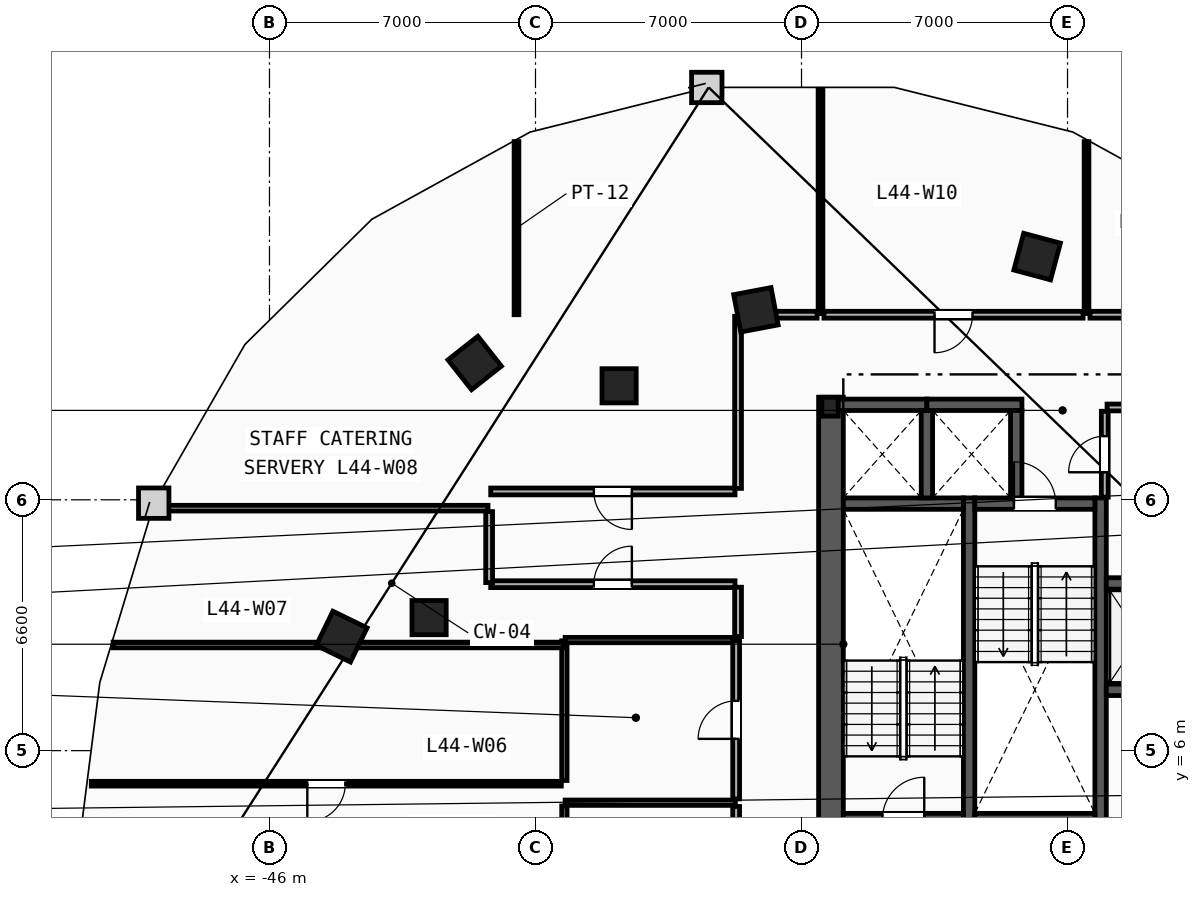
"""IFC4 building model, lengths in metres.
Left out: names, types, materials, properties, quantities, classifications, styles, units other than length and angle.
Written with IfcOpenShell. Run it as: python <this file> out.ifc"""

import sys

from ifc_helpers import new_model, si_unit, direction, frame, frame_2d, origin, origin_2d, place, context, subcontext, project, spatial, rectangle, i_section, extrude, element, fill, save


model = new_model("IFC4")
c1 = context("Model", 3, precision=1e-05, world=origin(), true_north=direction((0.0, 1.0)))
c2 = subcontext(c1, "Body", "Model", "MODEL_VIEW")
j1 = project(units=[si_unit("LENGTHUNIT", "METRE"), si_unit("PLANEANGLEUNIT", "RADIAN")], contexts=[c1])
p1 = place(None, origin())
s1 = spatial("IfcSite", under=j1, at=p1, CompositionType="ELEMENT")
p2 = place(p1, origin())
s2 = spatial("IfcBuilding", under=s1, at=p2, CompositionType="ELEMENT")
p3 = place(p2, frame((0.0, 0.0, 169.2)))
s3 = spatial("IfcBuildingStorey", under=s2, at=p3, CompositionType="ELEMENT", Elevation=169.2)
p4 = place(p3, frame((-31.25, 15.05, 0.0), z_axis=(0.0, 0.0, 1.0), x_axis=(1.0, 0.0, 0.0)))
e1 = element("IfcColumn", 1, at=p4, inside=s3, PredefinedType="COLUMN", context=c2, shape_type="SweptSolid", body=[
    extrude(i_section(OverallWidth=0.432, OverallDepth=0.498, WebThickness=0.056, FlangeThickness=0.089, FilletRadius=0.018, at=origin_2d()), origin(), (0.0, 0.0, 1.0), 3.6),
])
for number, where, z_axis, x_axis in (
    (2, (-41.8, 9.5, 0.0), (0.0, 0.0, 1.0), (1.0, 0.0, 0.0)),
    (3, (-36.8, 15.6, 0.0), (0.0, 0.0, 1.0), (1.0, 0.0, 0.0)),
):
    element("IfcColumn", number, at=place(p3, frame(where, z_axis=z_axis, x_axis=x_axis)), inside=s3, PredefinedType="COLUMN", context=c2, shape_type="SweptSolid", body=[
        extrude(rectangle(XDim=0.9, YDim=0.9, at=origin_2d()), origin(), (0.0, 0.0, 1.0), 3.6),
    ])
for number, where, z_axis, x_axis in (
    (4, (-25.8, 19.0, 0.0), (0.0, 0.0, 1.0), (-0.966, 0.259, 0.0)),
    (5, (-33.2, 17.6, 0.0), (0.0, 0.0, 1.0), (-0.983, -0.186, 0.0)),
    (6, (-40.6, 16.2, 0.0), (0.0, 0.0, 1.0), (-0.785, -0.619, 0.0)),
    (7, (-44.1, 9.0, 0.0), (0.0, 0.0, 1.0), (-0.437, -0.899, 0.0)),
):
    element("IfcColumn", number, at=place(p3, frame(where, z_axis=z_axis, x_axis=x_axis)), inside=s3, PredefinedType="COLUMN", context=c2, shape_type="SweptSolid", body=[
        extrude(rectangle(XDim=1.0, YDim=1.0, at=origin_2d()), origin(), (0.0, 0.0, 1.0), 3.6),
    ])
p5 = place(p3, frame((-31.225, 1.97, 0.0), z_axis=(0.0, 0.0, 1.0), x_axis=(0.0, 1.0, 0.0)))
e8 = element("IfcWall", 8, at=p5, inside=s3, PredefinedType="SHEAR", context=c2, shape_type="SweptSolid", body=[
    extrude(rectangle(XDim=13.33, YDim=0.65, at=frame_2d((6.665, 0.0))), origin(), (0.0, 0.0, 1.0), 3.36),
])
for number, where, z_axis, x_axis in (
    (9, (-27.59, 1.97, 0.0), (0.0, 0.0, 1.0), (0.0, 1.0, 0.0)),
    (10, (-24.13, 1.97, 0.0), (0.0, 0.0, 1.0), (0.0, 1.0, 0.0)),
):
    element("IfcWall", number, at=place(p3, frame(where, z_axis=z_axis, x_axis=x_axis)), inside=s3, PredefinedType="SHEAR", context=c2, shape_type="SweptSolid", body=[
        extrude(rectangle(XDim=10.68, YDim=0.3, at=frame_2d((5.34, 0.0))), origin(), (0.0, 0.0, 1.0), 3.36),
    ])
p6 = place(p3, frame((-30.9, 4.2, 0.0), z_axis=(0.0, 0.0, 1.0), x_axis=(1.0, 0.0, 0.0)))
e11 = element("IfcWall", 11, at=p6, inside=s3, PredefinedType="SHEAR", context=c2, shape_type="SweptSolid", body=[
    extrude(rectangle(XDim=3.16, YDim=0.3, at=frame_2d((1.58, 0.0))), origin(), (0.0, 0.0, 1.0), 3.36),
])
p7 = place(p6, frame((1.03, 0.0, 0.0)))
e12 = element("IfcOpeningElement", 12, at=p7, cuts=e11, PredefinedType="OPENING", context=c2, shape_type="SweptSolid", body=[
    extrude(rectangle(XDim=1.1, YDim=2.15, at=frame_2d((0.55, 1.075))), frame((0.0, 0.16, 0.0), z_axis=(0.0, -1.0, 0.0), x_axis=(1.0, 0.0, 0.0)), (0.0, 0.0, 1.0), 0.32),
])
p8 = place(p3, frame((-30.9, 12.5, 0.0), z_axis=(0.0, 0.0, 1.0), x_axis=(1.0, 0.0, 0.0)))
e13 = element("IfcWall", 13, at=p8, inside=s3, PredefinedType="SHEAR", context=c2, shape_type="SweptSolid", body=[
    extrude(rectangle(XDim=3.16, YDim=0.3, at=frame_2d((1.58, 0.0))), origin(), (0.0, 0.0, 1.0), 3.36),
])
p9 = place(p3, frame((-27.44, 12.5, 0.0), z_axis=(0.0, 0.0, 1.0), x_axis=(1.0, 0.0, 0.0)))
e14 = element("IfcWall", 14, at=p9, inside=s3, PredefinedType="SHEAR", context=c2, shape_type="SweptSolid", body=[
    extrude(rectangle(XDim=3.16, YDim=0.3, at=frame_2d((1.58, 0.0))), origin(), (0.0, 0.0, 1.0), 3.36),
])
p10 = place(p9, frame((1.03, 0.0, 0.0)))
e15 = element("IfcOpeningElement", 15, at=p10, cuts=e14, PredefinedType="OPENING", context=c2, shape_type="SweptSolid", body=[
    extrude(rectangle(XDim=1.1, YDim=2.15, at=frame_2d((0.55, 1.075))), frame((0.0, 0.16, 0.0), z_axis=(0.0, -1.0, 0.0), x_axis=(1.0, 0.0, 0.0)), (0.0, 0.0, 1.0), 0.32),
])
p11 = place(p3, frame((-27.44, 4.2, 0.0), z_axis=(0.0, 0.0, 1.0), x_axis=(1.0, 0.0, 0.0)))
e16 = element("IfcWall", 16, at=p11, inside=s3, PredefinedType="SHEAR", context=c2, shape_type="SweptSolid", body=[
    extrude(rectangle(XDim=3.16, YDim=0.3, at=frame_2d((1.58, 0.0))), origin(), (0.0, 0.0, 1.0), 3.36),
])
p12 = place(p3, frame((-23.98, 7.6, 0.0), z_axis=(0.0, 0.0, 1.0), x_axis=(1.0, 0.0, 0.0)))
e17 = element("IfcWall", 17, at=p12, inside=s3, PredefinedType="SHEAR", context=c2, shape_type="SweptSolid", body=[
    extrude(rectangle(XDim=2.1, YDim=0.3, at=frame_2d((1.05, 0.0))), origin(), (0.0, 0.0, 1.0), 3.36),
])
p13 = place(p12, frame((0.475, 0.0, 0.0)))
e18 = element("IfcOpeningElement", 18, at=p13, cuts=e17, PredefinedType="OPENING", context=c2, shape_type="SweptSolid", body=[
    extrude(rectangle(XDim=1.15, YDim=2.2, at=frame_2d((0.575, 1.1))), frame((0.0, 0.16, 0.0), z_axis=(0.0, -1.0, 0.0), x_axis=(1.0, 0.0, 0.0)), (0.0, 0.0, 1.0), 0.32),
])
p14 = place(p3, frame((-23.98, 10.4, 0.0), z_axis=(0.0, 0.0, 1.0), x_axis=(1.0, 0.0, 0.0)))
e19 = element("IfcWall", 19, at=p14, inside=s3, PredefinedType="SHEAR", context=c2, shape_type="SweptSolid", body=[
    extrude(rectangle(XDim=2.1, YDim=0.3, at=frame_2d((1.05, 0.0))), origin(), (0.0, 0.0, 1.0), 3.36),
])
p15 = place(p3, frame((-31.2, 15.1, 0.0), z_axis=(0.0, 0.0, 1.0), x_axis=(1.0, 0.0, 0.0)))
e20 = element("IfcWall", 20, at=p15, inside=s3, PredefinedType="SHEAR", context=c2, shape_type="SweptSolid", body=[
    extrude(rectangle(XDim=2.5, YDim=0.3, at=frame_2d((1.25, 0.0))), origin(), (0.0, 0.0, 1.0), 3.36),
])
p16 = place(p3, frame((-28.7, 12.65, 0.0), z_axis=(0.0, 0.0, 1.0), x_axis=(0.0, 1.0, 0.0)))
e21 = element("IfcWall", 21, at=p16, inside=s3, PredefinedType="SHEAR", context=c2, shape_type="SweptSolid", body=[
    extrude(rectangle(XDim=2.3, YDim=0.3, at=frame_2d((1.15, 0.0))), origin(), (0.0, 0.0, 1.0), 3.36),
])
p17 = place(p3, frame((-28.7, 15.1, 0.0), z_axis=(0.0, 0.0, 1.0), x_axis=(1.0, 0.0, 0.0)))
e22 = element("IfcWall", 22, at=p17, inside=s3, PredefinedType="SHEAR", context=c2, shape_type="SweptSolid", body=[
    extrude(rectangle(XDim=2.5, YDim=0.3, at=frame_2d((1.25, 0.0))), origin(), (0.0, 0.0, 1.0), 3.36),
])
p18 = place(p3, frame((-26.35, 12.65, 0.0), z_axis=(0.0, 0.0, 1.0), x_axis=(0.0, 1.0, 0.0)))
e23 = element("IfcWall", 23, at=p18, inside=s3, PredefinedType="SHEAR", context=c2, shape_type="SweptSolid", body=[
    extrude(rectangle(XDim=2.3, YDim=0.3, at=frame_2d((1.15, 0.0))), origin(), (0.0, 0.0, 1.0), 3.36),
])
p19 = place(p3, frame((-23.96, 15.03, 0.0), z_axis=(0.0, 0.0, 1.0), x_axis=(1.0, 0.0, 0.0)))
e24 = element("IfcWall", 24, at=p19, inside=s3, PredefinedType="PARTITIONING", context=c2, shape_type="SweptSolid", body=[
    extrude(rectangle(XDim=2.61, YDim=0.18, at=frame_2d((1.305, 0.0))), origin(), (0.0, 0.0, 1.0), 2.433),
])
p20 = place(p3, frame((-24.02, 12.67, 0.0), z_axis=(0.0, 0.0, 1.0), x_axis=(0.0, 1.0, 0.0)))
e25 = element("IfcWall", 25, at=p20, inside=s3, PredefinedType="PARTITIONING", context=c2, shape_type="SweptSolid", body=[
    extrude(rectangle(XDim=2.26, YDim=0.18, at=frame_2d((1.13, 0.0))), origin(), (0.0, 0.0, 1.0), 3.36),
])
p21 = place(p20, frame((0.655, 0.0, 0.0)))
e26 = element("IfcOpeningElement", 26, at=p21, cuts=e25, PredefinedType="OPENING", context=c2, shape_type="SweptSolid", body=[
    extrude(rectangle(XDim=0.95, YDim=2.1, at=frame_2d((0.475, 1.05))), frame((0.0, 0.1, 0.0), z_axis=(0.0, -1.0, 0.0), x_axis=(1.0, 0.0, 0.0)), (0.0, 0.0, 1.0), 0.2),
])
p22 = place(p3, frame((-38.24, 1.615, 0.0), z_axis=(0.0, 0.0, 1.0), x_axis=(0.0, 1.0, 0.0)))
e27 = element("IfcWall", 27, at=p22, inside=s3, PredefinedType="PARTITIONING", context=c2, shape_type="SweptSolid", body=[
    extrude(rectangle(XDim=2.93, YDim=0.14, at=frame_2d((1.465, 0.0))), origin(), (0.0, 0.0, 1.0), 3.36),
])
p23 = place(p3, frame((-38.24, 5.215, 0.0), z_axis=(0.0, 0.0, 1.0), x_axis=(0.0, 1.0, 0.0)))
e28 = element("IfcWall", 28, at=p23, inside=s3, PredefinedType="PARTITIONING", context=c2, shape_type="SweptSolid", body=[
    extrude(rectangle(XDim=3.675, YDim=0.14, at=frame_2d((1.837, 0.0))), origin(), (0.0, 0.0, 1.0), 3.36),
])
for number, where, z_axis, x_axis in (
    (29, (-38.22, 4.63, 0.0), (0.0, 0.0, 1.0), (1.0, 0.0, 0.0)),
    (30, (-38.22, 8.91, 0.0), (0.0, 0.0, 1.0), (1.0, 0.0, 0.0)),
):
    element("IfcWall", number, at=place(p3, frame(where, z_axis=z_axis, x_axis=x_axis)), inside=s3, PredefinedType="PARTITIONING", context=c2, shape_type="SweptSolid", body=[
        extrude(rectangle(XDim=4.48, YDim=0.14, at=frame_2d((2.24, 0.0))), origin(), (0.0, 0.0, 1.0), 3.36),
    ])
p24 = place(p3, frame((-33.72, 0.27, 0.0), z_axis=(0.0, 0.0, 1.0), x_axis=(0.0, 1.0, 0.0)))
e31 = element("IfcWall", 31, at=p24, inside=s3, PredefinedType="PARTITIONING", context=c2, shape_type="SweptSolid", body=[
    extrude(rectangle(XDim=4.26, YDim=0.18, at=frame_2d((2.13, 0.0))), origin(), (0.0, 0.0, 1.0), 3.36),
])
p25 = place(p24, frame((1.655, 0.0, 0.0)))
e32 = element("IfcOpeningElement", 32, at=p25, cuts=e31, PredefinedType="OPENING", context=c2, shape_type="SweptSolid", body=[
    extrude(rectangle(XDim=0.95, YDim=2.1, at=frame_2d((0.475, 1.05))), frame((0.0, 0.1, 0.0), z_axis=(0.0, -1.0, 0.0), x_axis=(1.0, 0.0, 0.0)), (0.0, 0.0, 1.0), 0.2),
])
p26 = place(p3, frame((-33.72, 4.73, 0.0), z_axis=(0.0, 0.0, 1.0), x_axis=(0.0, 1.0, 0.0)))
e33 = element("IfcWall", 33, at=p26, inside=s3, PredefinedType="PARTITIONING", context=c2, shape_type="SweptSolid", body=[
    extrude(rectangle(XDim=4.16, YDim=0.18, at=frame_2d((2.08, 0.0))), origin(), (0.0, 0.0, 1.0), 3.36),
])
p27 = place(p26, frame((1.58, 0.0, 0.0)))
e34 = element("IfcOpeningElement", 34, at=p27, cuts=e33, PredefinedType="OPENING", context=c2, shape_type="SweptSolid", body=[
    extrude(rectangle(XDim=1.0, YDim=2.15, at=frame_2d((0.5, 1.075))), frame((0.0, 0.1, 0.0), z_axis=(0.0, -1.0, 0.0), x_axis=(1.0, 0.0, 0.0)), (0.0, 0.0, 1.0), 0.2),
])
p28 = place(p3, frame((-50.115, 8.78, 0.0), z_axis=(0.0, 0.0, 1.0), x_axis=(1.0, 0.0, 0.0)))
e35 = element("IfcWall", 35, at=p28, inside=s3, PredefinedType="PARTITIONING", context=c2, shape_type="SweptSolid", body=[
    extrude(rectangle(XDim=11.845, YDim=0.15, at=frame_2d((5.922, 0.0))), origin(), (0.0, 0.0, 1.0), 3.36),
])
p29 = place(p3, frame((-49.024, 12.38, 0.0), z_axis=(0.0, 0.0, 1.0), x_axis=(1.0, 0.0, 0.0)))
e36 = element("IfcWall", 36, at=p29, inside=s3, PredefinedType="PARTITIONING", context=c2, shape_type="SweptSolid", body=[
    extrude(rectangle(XDim=8.774, YDim=0.15, at=frame_2d((4.387, 0.0))), origin(), (0.0, 0.0, 1.0), 3.36),
])
p30 = place(p3, frame((-39.5, 17.47, 0.0), z_axis=(0.0, 0.0, 1.0), x_axis=(0.0, 1.0, 0.0)))
e37 = element("IfcWall", 37, at=p30, inside=s3, PredefinedType="PARTITIONING", context=c2, shape_type="SweptSolid", body=[
    extrude(rectangle(XDim=4.555, YDim=0.125, at=frame_2d((2.278, 0.0))), origin(), (0.0, 0.0, 1.0), 3.36),
])
p31 = place(p3, frame((-31.5, 17.5, 0.0), z_axis=(0.0, 0.0, 1.0), x_axis=(0.0, 1.0, 0.0)))
e38 = element("IfcWall", 38, at=p31, inside=s3, PredefinedType="PARTITIONING", context=c2, shape_type="SweptSolid", body=[
    extrude(rectangle(XDim=5.902, YDim=0.125, at=frame_2d((2.951, 0.0))), origin(), (0.0, 0.0, 1.0), 3.36),
])
p32 = place(p3, frame((-24.5, 17.5, 0.0), z_axis=(0.0, 0.0, 1.0), x_axis=(0.0, 1.0, 0.0)))
e39 = element("IfcWall", 39, at=p32, inside=s3, PredefinedType="PARTITIONING", context=c2, shape_type="SweptSolid", body=[
    extrude(rectangle(XDim=4.525, YDim=0.125, at=frame_2d((2.263, 0.0))), origin(), (0.0, 0.0, 1.0), 3.36),
])
p33 = place(p3, frame((-40.178, 10.38, 0.0), z_axis=(0.0, 0.0, 1.0), x_axis=(1.0, 0.0, 0.0)))
e40 = element("IfcWall", 40, at=p33, inside=s3, PredefinedType="PARTITIONING", context=c2, shape_type="SweptSolid", body=[
    extrude(rectangle(XDim=6.428, YDim=0.18, at=frame_2d((3.214, 0.0))), origin(), (0.0, 0.0, 1.0), 3.36),
])
p34 = place(p33, frame((2.714, 0.0, 0.0)))
e41 = element("IfcOpeningElement", 41, at=p34, cuts=e40, PredefinedType="OPENING", context=c2, shape_type="SweptSolid", body=[
    extrude(rectangle(XDim=1.0, YDim=2.15, at=frame_2d((0.5, 1.075))), frame((0.0, 0.1, 0.0), z_axis=(0.0, -1.0, 0.0), x_axis=(1.0, 0.0, 0.0)), (0.0, 0.0, 1.0), 0.2),
])
p35 = place(p3, frame((-40.22, 12.29, 0.0), z_axis=(0.0, 0.0, 1.0), x_axis=(0.0, -1.0, 0.0)))
e42 = element("IfcWall", 42, at=p35, inside=s3, PredefinedType="PARTITIONING", context=c2, shape_type="SweptSolid", body=[
    extrude(rectangle(XDim=1.869, YDim=0.18, at=frame_2d((0.934, 0.0))), origin(), (0.0, 0.0, 1.0), 3.36),
])
p36 = place(p3, frame((-33.67, 10.3, 0.0), z_axis=(0.0, 0.0, 1.0), x_axis=(0.0, -1.0, 0.0)))
e43 = element("IfcWall", 43, at=p36, inside=s3, PredefinedType="PARTITIONING", context=c2, shape_type="SweptSolid", body=[
    extrude(rectangle(XDim=1.299, YDim=0.18, at=frame_2d((0.649, 0.0))), origin(), (0.0, 0.0, 1.0), 3.36),
])
p37 = place(p3, frame((-33.75, 12.82, 0.0), z_axis=(0.0, 0.0, 1.0), x_axis=(-1.0, 0.0, 0.0)))
e44 = element("IfcWall", 44, at=p37, inside=s3, PredefinedType="PARTITIONING", context=c2, shape_type="SweptSolid", body=[
    extrude(rectangle(XDim=6.428, YDim=0.18, at=frame_2d((3.214, 0.0))), origin(), (0.0, 0.0, 1.0), 3.36),
])
p38 = place(p37, frame((2.714, 0.0, 0.0)))
e45 = element("IfcOpeningElement", 45, at=p38, cuts=e44, PredefinedType="OPENING", context=c2, shape_type="SweptSolid", body=[
    extrude(rectangle(XDim=1.0, YDim=2.15, at=frame_2d((0.5, 1.075))), frame((0.0, 0.1, 0.0), z_axis=(0.0, -1.0, 0.0), x_axis=(1.0, 0.0, 0.0)), (0.0, 0.0, 1.0), 0.2),
])
p39 = place(p3, frame((-33.67, 17.428, 0.0), z_axis=(0.0, 0.0, 1.0), x_axis=(0.0, -1.0, 0.0)))
e46 = element("IfcWall", 46, at=p39, inside=s3, PredefinedType="PARTITIONING", context=c2, shape_type="SweptSolid", body=[
    extrude(rectangle(XDim=4.529, YDim=0.18, at=frame_2d((2.264, 0.0))), origin(), (0.0, 0.0, 1.0), 3.36),
])
p40 = place(p3, frame((-31.59, 17.47, 0.0), z_axis=(0.0, 0.0, 1.0), x_axis=(-1.0, 0.0, 0.0)))
e47 = element("IfcWall", 47, at=p40, inside=s3, PredefinedType="PARTITIONING", context=c2, shape_type="SweptSolid", body=[
    extrude(rectangle(XDim=2.038, YDim=0.18, at=frame_2d((1.019, 0.0))), origin(), (0.0, 0.0, 1.0), 3.36),
])
p41 = place(p3, frame((-18.342, 17.47, 0.0), z_axis=(0.0, 0.0, 1.0), x_axis=(-1.0, 0.0, 0.0)))
e48 = element("IfcWall", 48, at=p41, inside=s3, PredefinedType="PARTITIONING", context=c2, shape_type="SweptSolid", body=[
    extrude(rectangle(XDim=6.068, YDim=0.18, at=frame_2d((3.034, 0.0))), origin(), (0.0, 0.0, 1.0), 3.36),
])
p42 = place(p41, frame((2.534, 0.0, 0.0)))
e49 = element("IfcOpeningElement", 49, at=p42, cuts=e48, PredefinedType="OPENING", context=c2, shape_type="SweptSolid", body=[
    extrude(rectangle(XDim=1.0, YDim=2.15, at=frame_2d((0.5, 1.075))), frame((0.0, 0.1, 0.0), z_axis=(0.0, -1.0, 0.0), x_axis=(1.0, 0.0, 0.0)), (0.0, 0.0, 1.0), 0.2),
])
p43 = place(p3, frame((-24.59, 17.47, 0.0), z_axis=(0.0, 0.0, 1.0), x_axis=(-1.0, 0.0, 0.0)))
e50 = element("IfcWall", 50, at=p43, inside=s3, PredefinedType="PARTITIONING", context=c2, shape_type="SweptSolid", body=[
    extrude(rectangle(XDim=6.82, YDim=0.18, at=frame_2d((3.41, 0.0))), origin(), (0.0, 0.0, 1.0), 3.36),
])
p44 = place(p43, frame((2.91, 0.0, 0.0)))
e51 = element("IfcOpeningElement", 51, at=p44, cuts=e50, PredefinedType="OPENING", context=c2, shape_type="SweptSolid", body=[
    extrude(rectangle(XDim=1.0, YDim=2.15, at=frame_2d((0.5, 1.075))), frame((0.0, 0.1, 0.0), z_axis=(0.0, -1.0, 0.0), x_axis=(1.0, 0.0, 0.0)), (0.0, 0.0, 1.0), 0.2),
])
p45 = place(p3, frame((-38.32, 5.13, 0.0), z_axis=(0.0, 0.0, 1.0), x_axis=(-1.0, 0.0, 0.0)))
e52 = element("IfcWall", 52, at=p45, inside=s3, PredefinedType="PARTITIONING", context=c2, shape_type="SweptSolid", body=[
    extrude(rectangle(XDim=12.369, YDim=0.125, at=frame_2d((6.184, 0.0))), origin(), (0.0, 0.0, 1.0), 3.36),
])
p46 = place(p45, frame((5.684, 0.0, 0.0)))
e53 = element("IfcOpeningElement", 53, at=p46, cuts=e52, PredefinedType="OPENING", context=c2, shape_type="SweptSolid", body=[
    extrude(rectangle(XDim=1.0, YDim=2.15, at=frame_2d((0.5, 1.075))), frame((0.0, 0.073, 0.0), z_axis=(0.0, -1.0, 0.0), x_axis=(1.0, 0.0, 0.0)), (0.0, 0.0, 1.0), 0.145),
])
p47 = place(p10, origin())
e54 = element("IfcDoor", 54, at=p47, inside=s3, OperationType="SINGLE_SWING_LEFT", PredefinedType="DOOR", context=c2, shape_type="SweptSolid", body=[
    extrude(rectangle(XDim=1.1, YDim=2.15, at=frame_2d((0.55, 1.075))), frame((0.0, 0.025, 0.0), z_axis=(0.0, -1.0, 0.0), x_axis=(1.0, 0.0, 0.0)), (0.0, 0.0, 1.0), 0.05),
])
fill(e15, e54)
p48 = place(p46, origin())
e55 = element("IfcDoor", 55, at=p48, inside=s3, OperationType="SINGLE_SWING_RIGHT", PredefinedType="DOOR", context=c2, shape_type="SweptSolid", body=[
    extrude(rectangle(XDim=1.0, YDim=2.15, at=frame_2d((0.5, 1.075))), frame((0.0, 0.025, 0.0), z_axis=(0.0, -1.0, 0.0), x_axis=(1.0, 0.0, 0.0)), (0.0, 0.0, 1.0), 0.05),
])
fill(e53, e55)
p49 = place(p44, origin())
e56 = element("IfcDoor", 56, at=p49, inside=s3, OperationType="SINGLE_SWING_RIGHT", PredefinedType="DOOR", context=c2, shape_type="SweptSolid", body=[
    extrude(rectangle(XDim=1.0, YDim=2.15, at=frame_2d((0.5, 1.075))), frame((0.0, 0.025, 0.0), z_axis=(0.0, -1.0, 0.0), x_axis=(1.0, 0.0, 0.0)), (0.0, 0.0, 1.0), 0.05),
])
fill(e51, e56)
p50 = place(p34, origin())
e57 = element("IfcDoor", 57, at=p50, inside=s3, OperationType="SINGLE_SWING_RIGHT", PredefinedType="DOOR", context=c2, shape_type="SweptSolid", body=[
    extrude(rectangle(XDim=1.0, YDim=2.15, at=frame_2d((0.5, 1.075))), frame((0.0, 0.025, 0.0), z_axis=(0.0, -1.0, 0.0), x_axis=(1.0, 0.0, 0.0)), (0.0, 0.0, 1.0), 0.05),
])
fill(e41, e57)
p51 = place(p38, origin())
e58 = element("IfcDoor", 58, at=p51, inside=s3, OperationType="SINGLE_SWING_LEFT", PredefinedType="DOOR", context=c2, shape_type="SweptSolid", body=[
    extrude(rectangle(XDim=1.0, YDim=2.15, at=frame_2d((0.5, 1.075))), frame((0.0, 0.025, 0.0), z_axis=(0.0, -1.0, 0.0), x_axis=(1.0, 0.0, 0.0)), (0.0, 0.0, 1.0), 0.05),
])
fill(e45, e58)
p52 = place(p27, origin())
e59 = element("IfcDoor", 59, at=p52, inside=s3, OperationType="SINGLE_SWING_LEFT", PredefinedType="DOOR", context=c2, shape_type="SweptSolid", body=[
    extrude(rectangle(XDim=1.0, YDim=2.15, at=frame_2d((0.5, 1.075))), frame((0.0, 0.025, 0.0), z_axis=(0.0, -1.0, 0.0), x_axis=(1.0, 0.0, 0.0)), (0.0, 0.0, 1.0), 0.05),
])
fill(e34, e59)
p53 = place(p21, origin())
e60 = element("IfcDoor", 60, at=p53, inside=s3, OperationType="SINGLE_SWING_LEFT", PredefinedType="DOOR", context=c2, shape_type="SweptSolid", body=[
    extrude(rectangle(XDim=0.95, YDim=2.1, at=frame_2d((0.475, 1.05))), frame((0.0, 0.025, 0.0), z_axis=(0.0, -1.0, 0.0), x_axis=(1.0, 0.0, 0.0)), (0.0, 0.0, 1.0), 0.05),
])
fill(e26, e60)
save(model, sys.argv[1])
